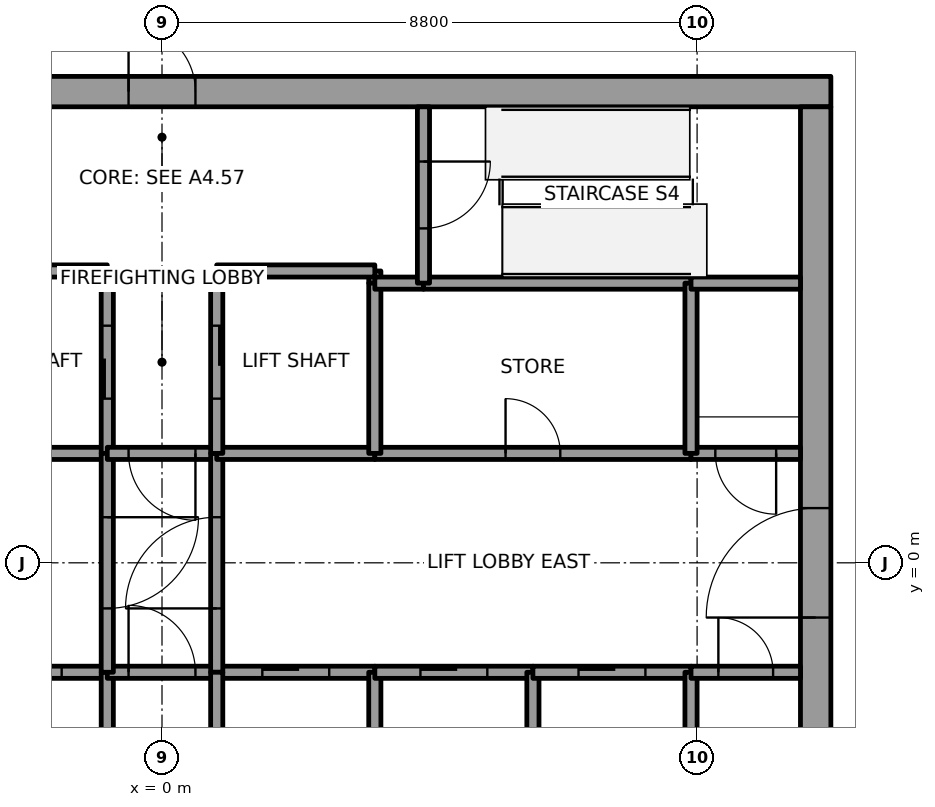
"""IFC4 building model, lengths in metres.
Left out: names, types, materials, properties, quantities, classifications, styles, units other than length and angle.
Written with IfcOpenShell. Run it as: python <this file> out.ifc"""

import sys

from ifc_helpers import new_model, si_unit, direction, frame, frame_2d, origin, place, context, subcontext, project, spatial, rectangle, extrude, element, fill, save


model = new_model("IFC4")
c1 = context("Model", 3, precision=1e-05, world=origin(), true_north=direction((0.0, 1.0)))
c2 = subcontext(c1, "Body", "Model", "MODEL_VIEW")
j1 = project(units=[si_unit("LENGTHUNIT", "METRE"), si_unit("PLANEANGLEUNIT", "RADIAN")], contexts=[c1])
p1 = place(None, origin())
s1 = spatial("IfcSite", under=j1, at=p1, CompositionType="ELEMENT")
p2 = place(p1, origin())
s2 = spatial("IfcBuilding", under=s1, at=p2, CompositionType="ELEMENT")
p3 = place(p2, frame((0.0, 0.0, 247.0)))
s3 = spatial("IfcBuildingStorey", under=s2, at=p3, CompositionType="ELEMENT", Elevation=247.0)
p4 = place(p3, frame((-11.0, 7.75, 0.0), z_axis=(0.0, 0.0, 1.0), x_axis=(1.0, 0.0, 0.0)))
e1 = element("IfcWall", 1, at=p4, inside=s3, PredefinedType="SHEAR", context=c2, shape_type="SweptSolid", body=[
    extrude(rectangle(XDim=22.0, YDim=0.5, at=frame_2d((11.0, 0.0))), origin(), (0.0, 0.0, 1.0), 4.0),
])
p5 = place(p4, frame((10.45, 0.0, 0.0)))
e2 = element("IfcOpeningElement", 2, at=p5, cuts=e1, PredefinedType="OPENING", context=c2, shape_type="SweptSolid", body=[
    extrude(rectangle(XDim=1.1, YDim=2.1, at=frame_2d((0.55, 1.05))), frame((0.0, 0.25, 0.0), z_axis=(0.0, -1.0, 0.0), x_axis=(1.0, 0.0, 0.0)), (0.0, 0.0, 1.0), 0.5),
])
p6 = place(p3, frame((10.75, -7.5, 0.0), z_axis=(0.0, 0.0, 1.0), x_axis=(0.0, 1.0, 0.0)))
e3 = element("IfcWall", 3, at=p6, inside=s3, PredefinedType="SHEAR", context=c2, shape_type="SweptSolid", body=[
    extrude(rectangle(XDim=15.0, YDim=0.5, at=frame_2d((7.5, 0.0))), origin(), (0.0, 0.0, 1.0), 4.0),
])
p7 = place(p6, frame((6.6, 0.0, 0.0)))
e4 = element("IfcOpeningElement", 4, at=p7, cuts=e3, PredefinedType="OPENING", context=c2, shape_type="SweptSolid", body=[
    extrude(rectangle(XDim=1.8, YDim=2.1, at=frame_2d((0.9, 1.05))), frame((0.0, 0.25, 0.0), z_axis=(0.0, -1.0, 0.0), x_axis=(1.0, 0.0, 0.0)), (0.0, 0.0, 1.0), 0.5),
])
p8 = place(p3, frame((-3.5, -1.8, 0.0), z_axis=(0.0, 0.0, 1.0), x_axis=(1.0, 0.0, 0.0)))
e5 = element("IfcWall", 5, at=p8, inside=s3, PredefinedType="SOLIDWALL", context=c2, shape_type="SweptSolid", body=[
    extrude(rectangle(XDim=2.6, YDim=0.2, at=frame_2d((1.3, 0.0))), origin(), (0.0, 0.0, 1.0), 3.85),
])
p9 = place(p8, frame((0.75, 0.0, 0.0)))
e6 = element("IfcOpeningElement", 6, at=p9, cuts=e5, PredefinedType="OPENING", context=c2, shape_type="SweptSolid", body=[
    extrude(rectangle(XDim=1.1, YDim=2.1, at=frame_2d((0.55, 1.05))), frame((0.0, 0.1, 0.0), z_axis=(0.0, -1.0, 0.0), x_axis=(1.0, 0.0, 0.0)), (0.0, 0.0, 1.0), 0.2),
])
p10 = place(p3, frame((-0.9, 1.8, 0.0), z_axis=(0.0, 0.0, 1.0), x_axis=(-1.0, 0.0, 0.0)))
e7 = element("IfcWall", 7, at=p10, inside=s3, PredefinedType="SOLIDWALL", context=c2, shape_type="SweptSolid", body=[
    extrude(rectangle(XDim=2.6, YDim=0.2, at=frame_2d((1.3, 0.0))), origin(), (0.0, 0.0, 1.0), 3.85),
])
p11 = place(p3, frame((-0.9, 1.8, 0.0), z_axis=(0.0, 0.0, 1.0), x_axis=(0.0, 1.0, 0.0)))
e8 = element("IfcWall", 8, at=p11, inside=s3, PredefinedType="SOLIDWALL", context=c2, shape_type="SweptSolid", body=[
    extrude(rectangle(XDim=3.0, YDim=0.2, at=frame_2d((1.5, 0.0))), origin(), (0.0, 0.0, 1.0), 3.85),
])
p12 = place(p11, frame((0.9, 0.0, 0.0)))
e9 = element("IfcOpeningElement", 9, at=p12, cuts=e8, PredefinedType="OPENING", context=c2, shape_type="SweptSolid", body=[
    extrude(rectangle(XDim=1.2, YDim=2.1, at=frame_2d((0.6, 1.05))), frame((0.0, 0.1, 0.0), z_axis=(0.0, -1.0, 0.0), x_axis=(1.0, 0.0, 0.0)), (0.0, 0.0, 1.0), 0.2),
])
p13 = place(p3, frame((-0.9, 4.8, 0.0), z_axis=(0.0, 0.0, 1.0), x_axis=(-1.0, 0.0, 0.0)))
e10 = element("IfcWall", 10, at=p13, inside=s3, PredefinedType="SOLIDWALL", context=c2, shape_type="SweptSolid", body=[
    extrude(rectangle(XDim=2.6, YDim=0.2, at=frame_2d((1.3, 0.0))), origin(), (0.0, 0.0, 1.0), 3.85),
])
p14 = place(p3, frame((-0.9, -4.6, 0.0), z_axis=(0.0, 0.0, 1.0), x_axis=(0.0, 1.0, 0.0)))
e11 = element("IfcWall", 11, at=p14, inside=s3, PredefinedType="SOLIDWALL", context=c2, shape_type="SweptSolid", body=[
    extrude(rectangle(XDim=2.8, YDim=0.2, at=frame_2d((1.4, 0.0))), origin(), (0.0, 0.0, 1.0), 3.85),
])
p15 = place(p3, frame((-0.9, -1.8, 0.0), z_axis=(0.0, 0.0, 1.0), x_axis=(1.0, 0.0, 0.0)))
e12 = element("IfcWall", 12, at=p15, inside=s3, PredefinedType="SOLIDWALL", context=c2, shape_type="SweptSolid", body=[
    extrude(rectangle(XDim=1.8, YDim=0.2, at=frame_2d((0.9, 0.0))), origin(), (0.0, 0.0, 1.0), 3.85),
])
p16 = place(p15, frame((0.35, 0.0, 0.0)))
e13 = element("IfcOpeningElement", 13, at=p16, cuts=e12, PredefinedType="OPENING", context=c2, shape_type="SweptSolid", body=[
    extrude(rectangle(XDim=1.1, YDim=2.1, at=frame_2d((0.55, 1.05))), frame((0.0, 0.1, 0.0), z_axis=(0.0, -1.0, 0.0), x_axis=(1.0, 0.0, 0.0)), (0.0, 0.0, 1.0), 0.2),
])
p17 = place(p3, frame((-0.9, 1.8, 0.0), z_axis=(0.0, 0.0, 1.0), x_axis=(0.0, -1.0, 0.0)))
e14 = element("IfcWall", 14, at=p17, inside=s3, PredefinedType="SOLIDWALL", context=c2, shape_type="SweptSolid", body=[
    extrude(rectangle(XDim=3.6, YDim=0.2, at=frame_2d((1.8, 0.0))), origin(), (0.0, 0.0, 1.0), 3.85),
])
p18 = place(p17, frame((1.05, 0.0, 0.0)))
e15 = element("IfcOpeningElement", 15, at=p18, cuts=e14, PredefinedType="OPENING", context=c2, shape_type="SweptSolid", body=[
    extrude(rectangle(XDim=1.5, YDim=2.1, at=frame_2d((0.75, 1.05))), frame((0.0, 0.1, 0.0), z_axis=(0.0, -1.0, 0.0), x_axis=(1.0, 0.0, 0.0)), (0.0, 0.0, 1.0), 0.2),
])
p19 = place(p3, frame((0.9, 1.8, 0.0), z_axis=(0.0, 0.0, 1.0), x_axis=(-1.0, 0.0, 0.0)))
e16 = element("IfcWall", 16, at=p19, inside=s3, PredefinedType="SOLIDWALL", context=c2, shape_type="SweptSolid", body=[
    extrude(rectangle(XDim=1.8, YDim=0.2, at=frame_2d((0.9, 0.0))), origin(), (0.0, 0.0, 1.0), 3.85),
])
p20 = place(p19, frame((0.35, 0.0, 0.0)))
e17 = element("IfcOpeningElement", 17, at=p20, cuts=e16, PredefinedType="OPENING", context=c2, shape_type="SweptSolid", body=[
    extrude(rectangle(XDim=1.1, YDim=2.1, at=frame_2d((0.55, 1.05))), frame((0.0, 0.1, 0.0), z_axis=(0.0, -1.0, 0.0), x_axis=(1.0, 0.0, 0.0)), (0.0, 0.0, 1.0), 0.2),
])
p21 = place(p3, frame((0.9, -1.8, 0.0), z_axis=(0.0, 0.0, 1.0), x_axis=(1.0, 0.0, 0.0)))
e18 = element("IfcWall", 18, at=p21, inside=s3, PredefinedType="SOLIDWALL", context=c2, shape_type="SweptSolid", body=[
    extrude(rectangle(XDim=2.6, YDim=0.2, at=frame_2d((1.3, 0.0))), origin(), (0.0, 0.0, 1.0), 3.85),
])
p22 = place(p21, frame((0.75, 0.0, 0.0)))
e19 = element("IfcOpeningElement", 19, at=p22, cuts=e18, PredefinedType="OPENING", context=c2, shape_type="SweptSolid", body=[
    extrude(rectangle(XDim=1.1, YDim=2.1, at=frame_2d((0.55, 1.05))), frame((0.0, 0.1, 0.0), z_axis=(0.0, -1.0, 0.0), x_axis=(1.0, 0.0, 0.0)), (0.0, 0.0, 1.0), 0.2),
])
p23 = place(p3, frame((0.9, -1.8, 0.0), z_axis=(0.0, 0.0, 1.0), x_axis=(0.0, 1.0, 0.0)))
e20 = element("IfcWall", 20, at=p23, inside=s3, PredefinedType="SOLIDWALL", context=c2, shape_type="SweptSolid", body=[
    extrude(rectangle(XDim=3.6, YDim=0.2, at=frame_2d((1.8, 0.0))), origin(), (0.0, 0.0, 1.0), 3.85),
])
p24 = place(p23, frame((1.05, 0.0, 0.0)))
e21 = element("IfcOpeningElement", 21, at=p24, cuts=e20, PredefinedType="OPENING", context=c2, shape_type="SweptSolid", body=[
    extrude(rectangle(XDim=1.5, YDim=2.1, at=frame_2d((0.75, 1.05))), frame((0.0, 0.1, 0.0), z_axis=(0.0, -1.0, 0.0), x_axis=(1.0, 0.0, 0.0)), (0.0, 0.0, 1.0), 0.2),
])
p25 = place(p3, frame((0.9, -1.8, 0.0), z_axis=(0.0, 0.0, 1.0), x_axis=(0.0, -1.0, 0.0)))
e22 = element("IfcWall", 22, at=p25, inside=s3, PredefinedType="SOLIDWALL", context=c2, shape_type="SweptSolid", body=[
    extrude(rectangle(XDim=2.8, YDim=0.2, at=frame_2d((1.4, 0.0))), origin(), (0.0, 0.0, 1.0), 3.85),
])
p26 = place(p3, frame((3.5, 1.8, 0.0), z_axis=(0.0, 0.0, 1.0), x_axis=(-1.0, 0.0, 0.0)))
e23 = element("IfcWall", 23, at=p26, inside=s3, PredefinedType="SOLIDWALL", context=c2, shape_type="SweptSolid", body=[
    extrude(rectangle(XDim=2.6, YDim=0.2, at=frame_2d((1.3, 0.0))), origin(), (0.0, 0.0, 1.0), 3.85),
])
p27 = place(p3, frame((3.5, 4.6, 0.0), z_axis=(0.0, 0.0, 1.0), x_axis=(0.0, 1.0, 0.0)))
e24 = element("IfcWall", 24, at=p27, inside=s3, PredefinedType="SOLIDWALL", context=c2, shape_type="SweptSolid", body=[
    extrude(rectangle(XDim=0.2, YDim=0.2, at=frame_2d((0.1, 0.0))), origin(), (0.0, 0.0, 1.0), 3.85),
])
p28 = place(p3, frame((3.5, 4.8, 0.0), z_axis=(0.0, 0.0, 1.0), x_axis=(-1.0, 0.0, 0.0)))
e25 = element("IfcWall", 25, at=p28, inside=s3, PredefinedType="SOLIDWALL", context=c2, shape_type="SweptSolid", body=[
    extrude(rectangle(XDim=2.6, YDim=0.2, at=frame_2d((1.3, 0.0))), origin(), (0.0, 0.0, 1.0), 3.85),
])
p29 = place(p3, frame((0.9, 4.8, 0.0), z_axis=(0.0, 0.0, 1.0), x_axis=(0.0, -1.0, 0.0)))
e26 = element("IfcWall", 26, at=p29, inside=s3, PredefinedType="SOLIDWALL", context=c2, shape_type="SweptSolid", body=[
    extrude(rectangle(XDim=3.0, YDim=0.2, at=frame_2d((1.5, 0.0))), origin(), (0.0, 0.0, 1.0), 3.85),
])
p30 = place(p29, frame((0.9, 0.0, 0.0)))
e27 = element("IfcOpeningElement", 27, at=p30, cuts=e26, PredefinedType="OPENING", context=c2, shape_type="SweptSolid", body=[
    extrude(rectangle(XDim=1.2, YDim=2.1, at=frame_2d((0.6, 1.05))), frame((0.0, 0.1, 0.0), z_axis=(0.0, -1.0, 0.0), x_axis=(1.0, 0.0, 0.0)), (0.0, 0.0, 1.0), 0.2),
])
p31 = place(p3, frame((3.5, -4.6, 0.0), z_axis=(0.0, 0.0, 1.0), x_axis=(0.0, 1.0, 0.0)))
e28 = element("IfcWall", 28, at=p31, inside=s3, PredefinedType="SOLIDWALL", context=c2, shape_type="SweptSolid", body=[
    extrude(rectangle(XDim=2.8, YDim=0.2, at=frame_2d((1.4, 0.0))), origin(), (0.0, 0.0, 1.0), 3.85),
])
p32 = place(p3, frame((3.5, -1.8, 0.0), z_axis=(0.0, 0.0, 1.0), x_axis=(1.0, 0.0, 0.0)))
e29 = element("IfcWall", 29, at=p32, inside=s3, PredefinedType="SOLIDWALL", context=c2, shape_type="SweptSolid", body=[
    extrude(rectangle(XDim=2.6, YDim=0.2, at=frame_2d((1.3, 0.0))), origin(), (0.0, 0.0, 1.0), 3.85),
])
p33 = place(p32, frame((0.75, 0.0, 0.0)))
e30 = element("IfcOpeningElement", 30, at=p33, cuts=e29, PredefinedType="OPENING", context=c2, shape_type="SweptSolid", body=[
    extrude(rectangle(XDim=1.1, YDim=2.1, at=frame_2d((0.55, 1.05))), frame((0.0, 0.1, 0.0), z_axis=(0.0, -1.0, 0.0), x_axis=(1.0, 0.0, 0.0)), (0.0, 0.0, 1.0), 0.2),
])
p34 = place(p3, frame((3.5, 1.8, 0.0), z_axis=(0.0, 0.0, 1.0), x_axis=(1.0, 0.0, 0.0)))
e31 = element("IfcWall", 31, at=p34, inside=s3, PredefinedType="SOLIDWALL", context=c2, shape_type="SweptSolid", body=[
    extrude(rectangle(XDim=5.2, YDim=0.2, at=frame_2d((2.6, 0.0))), origin(), (0.0, 0.0, 1.0), 3.85),
])
p35 = place(p34, frame((2.15, 0.0, 0.0)))
e32 = element("IfcOpeningElement", 32, at=p35, cuts=e31, PredefinedType="OPENING", context=c2, shape_type="SweptSolid", body=[
    extrude(rectangle(XDim=0.9, YDim=2.1, at=frame_2d((0.45, 1.05))), frame((0.0, 0.1, 0.0), z_axis=(0.0, -1.0, 0.0), x_axis=(1.0, 0.0, 0.0)), (0.0, 0.0, 1.0), 0.2),
])
p36 = place(p3, frame((3.5, 4.6, 0.0), z_axis=(0.0, 0.0, 1.0), x_axis=(0.0, -1.0, 0.0)))
e33 = element("IfcWall", 33, at=p36, inside=s3, PredefinedType="SOLIDWALL", context=c2, shape_type="SweptSolid", body=[
    extrude(rectangle(XDim=2.8, YDim=0.2, at=frame_2d((1.4, 0.0))), origin(), (0.0, 0.0, 1.0), 3.85),
])
p37 = place(p3, frame((4.3, 4.6, 0.0), z_axis=(0.0, 0.0, 1.0), x_axis=(-1.0, 0.0, 0.0)))
e34 = element("IfcWall", 34, at=p37, inside=s3, PredefinedType="SOLIDWALL", context=c2, shape_type="SweptSolid", body=[
    extrude(rectangle(XDim=0.8, YDim=0.2, at=frame_2d((0.4, 0.0))), origin(), (0.0, 0.0, 1.0), 3.85),
])
p38 = place(p3, frame((8.7, 4.6, 0.0), z_axis=(0.0, 0.0, 1.0), x_axis=(-1.0, 0.0, 0.0)))
e35 = element("IfcWall", 35, at=p38, inside=s3, PredefinedType="SOLIDWALL", context=c2, shape_type="SweptSolid", body=[
    extrude(rectangle(XDim=4.4, YDim=0.2, at=frame_2d((2.2, 0.0))), origin(), (0.0, 0.0, 1.0), 3.85),
])
p39 = place(p3, frame((4.3, 7.5, 0.0), z_axis=(0.0, 0.0, 1.0), x_axis=(0.0, -1.0, 0.0)))
e36 = element("IfcWall", 36, at=p39, inside=s3, PredefinedType="SOLIDWALL", context=c2, shape_type="SweptSolid", body=[
    extrude(rectangle(XDim=2.9, YDim=0.2, at=frame_2d((1.45, 0.0))), origin(), (0.0, 0.0, 1.0), 3.85),
])
p40 = place(p39, frame((0.9, 0.0, 0.0)))
e37 = element("IfcOpeningElement", 37, at=p40, cuts=e36, PredefinedType="OPENING", context=c2, shape_type="SweptSolid", body=[
    extrude(rectangle(XDim=1.1, YDim=2.1, at=frame_2d((0.55, 1.05))), frame((0.0, 0.1, 0.0), z_axis=(0.0, -1.0, 0.0), x_axis=(1.0, 0.0, 0.0)), (0.0, 0.0, 1.0), 0.2),
])
p41 = place(p3, frame((6.1, -4.6, 0.0), z_axis=(0.0, 0.0, 1.0), x_axis=(0.0, 1.0, 0.0)))
e38 = element("IfcWall", 38, at=p41, inside=s3, PredefinedType="SOLIDWALL", context=c2, shape_type="SweptSolid", body=[
    extrude(rectangle(XDim=2.8, YDim=0.2, at=frame_2d((1.4, 0.0))), origin(), (0.0, 0.0, 1.0), 3.85),
])
p42 = place(p3, frame((6.1, -1.8, 0.0), z_axis=(0.0, 0.0, 1.0), x_axis=(1.0, 0.0, 0.0)))
e39 = element("IfcWall", 39, at=p42, inside=s3, PredefinedType="SOLIDWALL", context=c2, shape_type="SweptSolid", body=[
    extrude(rectangle(XDim=2.6, YDim=0.2, at=frame_2d((1.3, 0.0))), origin(), (0.0, 0.0, 1.0), 3.85),
])
p43 = place(p42, frame((0.75, 0.0, 0.0)))
e40 = element("IfcOpeningElement", 40, at=p43, cuts=e39, PredefinedType="OPENING", context=c2, shape_type="SweptSolid", body=[
    extrude(rectangle(XDim=1.1, YDim=2.1, at=frame_2d((0.55, 1.05))), frame((0.0, 0.1, 0.0), z_axis=(0.0, -1.0, 0.0), x_axis=(1.0, 0.0, 0.0)), (0.0, 0.0, 1.0), 0.2),
])
p44 = place(p3, frame((8.7, -1.8, 0.0), z_axis=(0.0, 0.0, 1.0), x_axis=(0.0, -1.0, 0.0)))
e41 = element("IfcWall", 41, at=p44, inside=s3, PredefinedType="SOLIDWALL", context=c2, shape_type="SweptSolid", body=[
    extrude(rectangle(XDim=2.8, YDim=0.2, at=frame_2d((1.4, 0.0))), origin(), (0.0, 0.0, 1.0), 3.85),
])
p45 = place(p3, frame((8.7, -1.8, 0.0), z_axis=(0.0, 0.0, 1.0), x_axis=(1.0, 0.0, 0.0)))
e42 = element("IfcWall", 42, at=p45, inside=s3, PredefinedType="SOLIDWALL", context=c2, shape_type="SweptSolid", body=[
    extrude(rectangle(XDim=1.8, YDim=0.2, at=frame_2d((0.9, 0.0))), origin(), (0.0, 0.0, 1.0), 3.85),
])
p46 = place(p45, frame((0.45, 0.0, 0.0)))
e43 = element("IfcOpeningElement", 43, at=p46, cuts=e42, PredefinedType="OPENING", context=c2, shape_type="SweptSolid", body=[
    extrude(rectangle(XDim=0.9, YDim=2.1, at=frame_2d((0.45, 1.05))), frame((0.0, 0.1, 0.0), z_axis=(0.0, -1.0, 0.0), x_axis=(1.0, 0.0, 0.0)), (0.0, 0.0, 1.0), 0.2),
])
p47 = place(p3, frame((10.5, 1.8, 0.0), z_axis=(0.0, 0.0, 1.0), x_axis=(-1.0, 0.0, 0.0)))
e44 = element("IfcWall", 44, at=p47, inside=s3, PredefinedType="SOLIDWALL", context=c2, shape_type="SweptSolid", body=[
    extrude(rectangle(XDim=1.8, YDim=0.2, at=frame_2d((0.9, 0.0))), origin(), (0.0, 0.0, 1.0), 3.85),
])
p48 = place(p47, frame((0.4, 0.0, 0.0)))
e45 = element("IfcOpeningElement", 45, at=p48, cuts=e44, PredefinedType="OPENING", context=c2, shape_type="SweptSolid", body=[
    extrude(rectangle(XDim=1.0, YDim=2.1, at=frame_2d((0.5, 1.05))), frame((0.0, 0.1, 0.0), z_axis=(0.0, -1.0, 0.0), x_axis=(1.0, 0.0, 0.0)), (0.0, 0.0, 1.0), 0.2),
])
p49 = place(p3, frame((8.7, 1.8, 0.0), z_axis=(0.0, 0.0, 1.0), x_axis=(0.0, 1.0, 0.0)))
e46 = element("IfcWall", 46, at=p49, inside=s3, PredefinedType="SOLIDWALL", context=c2, shape_type="SweptSolid", body=[
    extrude(rectangle(XDim=2.8, YDim=0.2, at=frame_2d((1.4, 0.0))), origin(), (0.0, 0.0, 1.0), 3.85),
])
p50 = place(p3, frame((10.5, 4.6, 0.0), z_axis=(0.0, 0.0, 1.0), x_axis=(-1.0, 0.0, 0.0)))
e47 = element("IfcWall", 47, at=p50, inside=s3, PredefinedType="SOLIDWALL", context=c2, shape_type="SweptSolid", body=[
    extrude(rectangle(XDim=1.8, YDim=0.2, at=frame_2d((0.9, 0.0))), origin(), (0.0, 0.0, 1.0), 3.85),
])
p51 = place(p9, origin())
e48 = element("IfcDoor", 48, at=p51, inside=s3, OperationType="SLIDING_TO_LEFT", PredefinedType="DOOR", context=c2, shape_type="SweptSolid", body=[
    extrude(rectangle(XDim=1.1, YDim=2.1, at=frame_2d((0.55, 1.05))), frame((0.0, 0.025, 0.0), z_axis=(0.0, -1.0, 0.0), x_axis=(1.0, 0.0, 0.0)), (0.0, 0.0, 1.0), 0.05),
])
fill(e6, e48)
p52 = place(p22, origin())
e49 = element("IfcDoor", 49, at=p52, inside=s3, OperationType="SLIDING_TO_RIGHT", PredefinedType="DOOR", context=c2, shape_type="SweptSolid", body=[
    extrude(rectangle(XDim=1.1, YDim=2.1, at=frame_2d((0.55, 1.05))), frame((0.0, 0.025, 0.0), z_axis=(0.0, -1.0, 0.0), x_axis=(1.0, 0.0, 0.0)), (0.0, 0.0, 1.0), 0.05),
])
fill(e19, e49)
p53 = place(p33, origin())
e50 = element("IfcDoor", 50, at=p53, inside=s3, OperationType="SLIDING_TO_LEFT", PredefinedType="DOOR", context=c2, shape_type="SweptSolid", body=[
    extrude(rectangle(XDim=1.1, YDim=2.1, at=frame_2d((0.55, 1.05))), frame((0.0, 0.025, 0.0), z_axis=(0.0, -1.0, 0.0), x_axis=(1.0, 0.0, 0.0)), (0.0, 0.0, 1.0), 0.05),
])
fill(e30, e50)
p54 = place(p43, origin())
e51 = element("IfcDoor", 51, at=p54, inside=s3, OperationType="SLIDING_TO_LEFT", PredefinedType="DOOR", context=c2, shape_type="SweptSolid", body=[
    extrude(rectangle(XDim=1.1, YDim=2.1, at=frame_2d((0.55, 1.05))), frame((0.0, 0.025, 0.0), z_axis=(0.0, -1.0, 0.0), x_axis=(1.0, 0.0, 0.0)), (0.0, 0.0, 1.0), 0.05),
])
fill(e40, e51)
p55 = place(p12, origin())
e52 = element("IfcDoor", 52, at=p55, inside=s3, OperationType="SLIDING_TO_RIGHT", PredefinedType="DOOR", context=c2, shape_type="SweptSolid", body=[
    extrude(rectangle(XDim=1.2, YDim=2.1, at=frame_2d((0.6, 1.05))), frame((0.0, 0.025, 0.0), z_axis=(0.0, -1.0, 0.0), x_axis=(1.0, 0.0, 0.0)), (0.0, 0.0, 1.0), 0.05),
])
fill(e9, e52)
p56 = place(p30, origin())
e53 = element("IfcDoor", 53, at=p56, inside=s3, OperationType="SLIDING_TO_LEFT", PredefinedType="DOOR", context=c2, shape_type="SweptSolid", body=[
    extrude(rectangle(XDim=1.2, YDim=2.1, at=frame_2d((0.6, 1.05))), frame((0.0, 0.025, 0.0), z_axis=(0.0, -1.0, 0.0), x_axis=(1.0, 0.0, 0.0)), (0.0, 0.0, 1.0), 0.05),
])
fill(e27, e53)
p57 = place(p18, origin())
e54 = element("IfcDoor", 54, at=p57, inside=s3, OperationType="DOUBLE_DOOR_SINGLE_SWING", PredefinedType="DOOR", context=c2, shape_type="SweptSolid", body=[
    extrude(rectangle(XDim=1.5, YDim=2.1, at=frame_2d((0.75, 1.05))), frame((0.0, 0.025, 0.0), z_axis=(0.0, -1.0, 0.0), x_axis=(1.0, 0.0, 0.0)), (0.0, 0.0, 1.0), 0.05),
])
fill(e15, e54)
p58 = place(p24, origin())
e55 = element("IfcDoor", 55, at=p58, inside=s3, OperationType="DOUBLE_DOOR_SINGLE_SWING", PredefinedType="DOOR", context=c2, shape_type="SweptSolid", body=[
    extrude(rectangle(XDim=1.5, YDim=2.1, at=frame_2d((0.75, 1.05))), frame((0.0, 0.025, 0.0), z_axis=(0.0, -1.0, 0.0), x_axis=(1.0, 0.0, 0.0)), (0.0, 0.0, 1.0), 0.05),
])
fill(e21, e55)
p59 = place(p20, origin())
e56 = element("IfcDoor", 56, at=p59, inside=s3, OperationType="SINGLE_SWING_RIGHT", PredefinedType="DOOR", context=c2, shape_type="SweptSolid", body=[
    extrude(rectangle(XDim=1.1, YDim=2.1, at=frame_2d((0.55, 1.05))), frame((0.0, 0.025, 0.0), z_axis=(0.0, -1.0, 0.0), x_axis=(1.0, 0.0, 0.0)), (0.0, 0.0, 1.0), 0.05),
])
fill(e17, e56)
p60 = place(p16, origin())
e57 = element("IfcDoor", 57, at=p60, inside=s3, OperationType="SINGLE_SWING_RIGHT", PredefinedType="DOOR", context=c2, shape_type="SweptSolid", body=[
    extrude(rectangle(XDim=1.1, YDim=2.1, at=frame_2d((0.55, 1.05))), frame((0.0, 0.025, 0.0), z_axis=(0.0, -1.0, 0.0), x_axis=(1.0, 0.0, 0.0)), (0.0, 0.0, 1.0), 0.05),
])
fill(e13, e57)
p61 = place(p48, origin())
e58 = element("IfcDoor", 58, at=p61, inside=s3, OperationType="SINGLE_SWING_LEFT", PredefinedType="DOOR", context=c2, shape_type="SweptSolid", body=[
    extrude(rectangle(XDim=1.0, YDim=2.1, at=frame_2d((0.5, 1.05))), frame((0.0, 0.025, 0.0), z_axis=(0.0, -1.0, 0.0), x_axis=(1.0, 0.0, 0.0)), (0.0, 0.0, 1.0), 0.05),
])
fill(e45, e58)
p62 = place(p40, origin())
e59 = element("IfcDoor", 59, at=p62, inside=s3, OperationType="SINGLE_SWING_RIGHT", PredefinedType="DOOR", context=c2, shape_type="SweptSolid", body=[
    extrude(rectangle(XDim=1.1, YDim=2.1, at=frame_2d((0.55, 1.05))), frame((0.0, 0.025, 0.0), z_axis=(0.0, -1.0, 0.0), x_axis=(1.0, 0.0, 0.0)), (0.0, 0.0, 1.0), 0.05),
])
fill(e37, e59)
p63 = place(p35, origin())
e60 = element("IfcDoor", 60, at=p63, inside=s3, OperationType="SINGLE_SWING_RIGHT", PredefinedType="DOOR", context=c2, shape_type="SweptSolid", body=[
    extrude(rectangle(XDim=0.9, YDim=2.1, at=frame_2d((0.45, 1.05))), frame((0.0, 0.025, 0.0), z_axis=(0.0, -1.0, 0.0), x_axis=(1.0, 0.0, 0.0)), (0.0, 0.0, 1.0), 0.05),
])
fill(e32, e60)
p64 = place(p46, origin())
e61 = element("IfcDoor", 61, at=p64, inside=s3, OperationType="SINGLE_SWING_LEFT", PredefinedType="DOOR", context=c2, shape_type="SweptSolid", body=[
    extrude(rectangle(XDim=0.9, YDim=2.1, at=frame_2d((0.45, 1.05))), frame((0.0, 0.025, 0.0), z_axis=(0.0, -1.0, 0.0), x_axis=(1.0, 0.0, 0.0)), (0.0, 0.0, 1.0), 0.05),
])
fill(e43, e61)
p65 = place(p7, origin())
e62 = element("IfcDoor", 62, at=p65, inside=s3, OperationType="DOUBLE_DOOR_SINGLE_SWING", PredefinedType="DOOR", context=c2, shape_type="SweptSolid", body=[
    extrude(rectangle(XDim=1.8, YDim=2.1, at=frame_2d((0.9, 1.05))), frame((0.0, 0.025, 0.0), z_axis=(0.0, -1.0, 0.0), x_axis=(1.0, 0.0, 0.0)), (0.0, 0.0, 1.0), 0.05),
])
fill(e4, e62)
p66 = place(p5, origin())
e63 = element("IfcDoor", 63, at=p66, inside=s3, OperationType="SINGLE_SWING_RIGHT", PredefinedType="DOOR", context=c2, shape_type="SweptSolid", body=[
    extrude(rectangle(XDim=1.1, YDim=2.1, at=frame_2d((0.55, 1.05))), frame((0.0, 0.025, 0.0), z_axis=(0.0, -1.0, 0.0), x_axis=(1.0, 0.0, 0.0)), (0.0, 0.0, 1.0), 0.05),
])
fill(e2, e63)
save(model, sys.argv[1])
